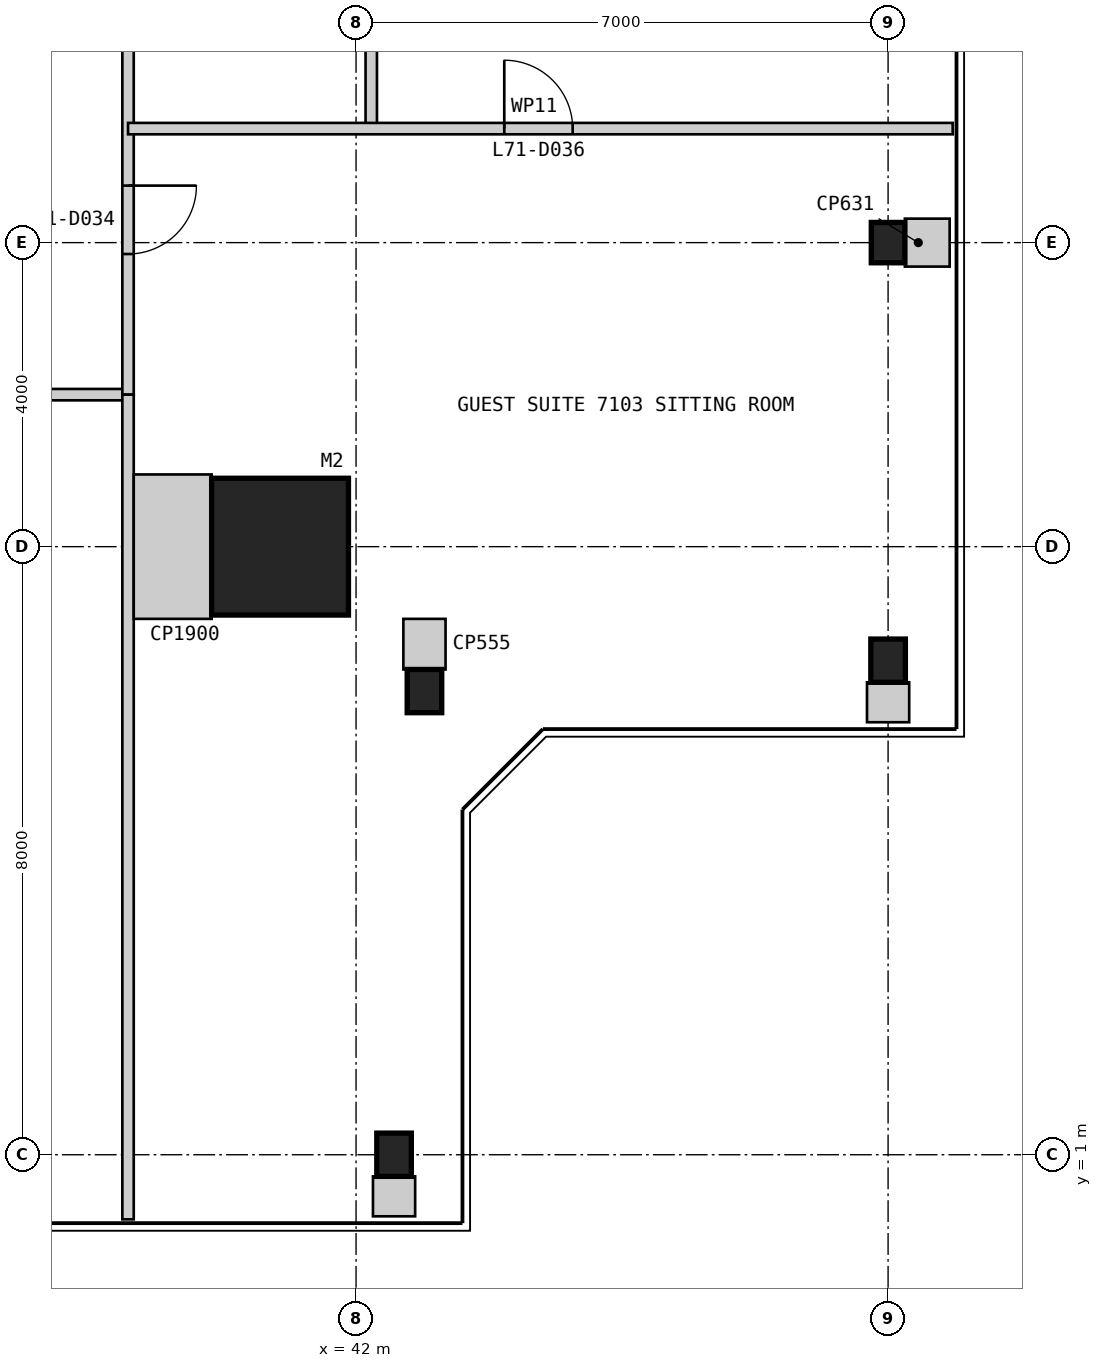
"""IFC4 building model, lengths in metres.
Left out: names, types, materials, properties, quantities, classifications, styles, units other than length and angle.
Written with IfcOpenShell. Run it as: python <this file> out.ifc"""

import sys

from ifc_helpers import new_model, si_unit, direction, frame, frame_2d, origin, origin_2d, place, context, subcontext, project, spatial, rectangle, i_section, extrude, element, fill, save


model = new_model("IFC4")
c1 = context("Model", 3, precision=1e-05, world=origin(), true_north=direction((0.0, 1.0)))
c2 = subcontext(c1, "Body", "Model", "MODEL_VIEW")
j1 = project(units=[si_unit("LENGTHUNIT", "METRE"), si_unit("PLANEANGLEUNIT", "RADIAN")], contexts=[c1])
p1 = place(None, origin())
s1 = spatial("IfcSite", under=j1, at=p1, CompositionType="ELEMENT")
p2 = place(p1, origin())
s2 = spatial("IfcBuilding", under=s1, at=p2, CompositionType="ELEMENT")
p3 = place(p2, frame((0.0, 0.0, 293.4)))
s3 = spatial("IfcBuildingStorey", under=s2, at=p3, CompositionType="ELEMENT", Elevation=293.4)
p4 = place(p3, frame((41.0, 9.0, 0.0), z_axis=(0.0, 0.0, 1.0), x_axis=(1.0, 0.0, 0.0)))
e1 = element("IfcColumn", 1, at=p4, inside=s3, PredefinedType="COLUMN", context=c2, shape_type="SweptSolid", body=[
    extrude(rectangle(XDim=1.8, YDim=1.8, at=origin_2d()), origin(), (0.0, 0.0, 1.0), 3.4),
])
for number, where, z_axis, x_axis in (
    (2, (42.5, 1.0, 0.0), (0.0, 0.0, 1.0), (1.0, 0.0, 0.0)),
    (3, (42.9, 7.1, 0.0), (0.0, 0.0, 1.0), (1.0, 0.0, 0.0)),
    (4, (49.0, 7.5, 0.0), (0.0, 0.0, 1.0), (1.0, 0.0, 0.0)),
):
    element("IfcColumn", number, at=place(p3, frame(where, z_axis=z_axis, x_axis=x_axis)), inside=s3, PredefinedType="COLUMN", context=c2, shape_type="SweptSolid", body=[
        extrude(i_section(OverallWidth=0.455, OverallDepth=0.569, WebThickness=0.078, FlangeThickness=0.125, at=origin_2d()), origin(), (0.0, 0.0, 1.0), 3.4),
    ])
p5 = place(p3, frame((49.0, 13.0, 0.0), z_axis=(0.0, 0.0, 1.0), x_axis=(1.0, 0.0, 0.0)))
e5 = element("IfcColumn", 5, at=p5, inside=s3, PredefinedType="COLUMN", context=c2, shape_type="SweptSolid", body=[
    extrude(i_section(OverallWidth=0.442, OverallDepth=0.531, WebThickness=0.066, FlangeThickness=0.106, at=origin_2d()), origin(), (0.0, 0.0, 1.0), 3.4),
])
p6 = place(p3, frame((11.0, 11.0, 0.0), z_axis=(0.0, 0.0, 1.0), x_axis=(1.0, 0.0, 0.0)))
e6 = element("IfcWall", 6, at=p6, inside=s3, PredefinedType="PARTITIONING", context=c2, shape_type="SweptSolid", body=[
    extrude(rectangle(XDim=28.0, YDim=0.15, at=frame_2d((14.0, 0.0))), origin(), (0.0, 0.0, 1.0), 2.794),
])
p7 = place(p6, frame((1.85, 0.0, 0.0)))
e7 = element("IfcOpeningElement", 7, at=p7, cuts=e6, PredefinedType="OPENING", context=c2, shape_type="SweptSolid", body=[
    extrude(rectangle(XDim=1.0, YDim=2.1, at=frame_2d((0.5, 1.05))), frame((0.0, 0.085, 0.0), z_axis=(0.0, -1.0, 0.0), x_axis=(1.0, 0.0, 0.0)), (0.0, 0.0, 1.0), 0.17),
])
p8 = place(p6, frame((18.1, 0.0, 0.0)))
e8 = element("IfcOpeningElement", 8, at=p8, cuts=e6, PredefinedType="OPENING", context=c2, shape_type="SweptSolid", body=[
    extrude(rectangle(XDim=0.9, YDim=2.1, at=frame_2d((0.45, 1.05))), frame((0.0, 0.085, 0.0), z_axis=(0.0, -1.0, 0.0), x_axis=(1.0, 0.0, 0.0)), (0.0, 0.0, 1.0), 0.17),
])
p9 = place(p3, frame((39.0, 11.0, 0.0), z_axis=(0.0, 0.0, 1.0), x_axis=(0.0, 1.0, 0.0)))
e9 = element("IfcWall", 9, at=p9, inside=s3, PredefinedType="PARTITIONING", context=c2, shape_type="SweptSolid", body=[
    extrude(rectangle(XDim=28.0, YDim=0.15, at=frame_2d((14.0, 0.0))), origin(), (0.0, 0.0, 1.0), 2.794),
])
p10 = place(p9, frame((1.85, 0.0, 0.0)))
e10 = element("IfcOpeningElement", 10, at=p10, cuts=e9, PredefinedType="OPENING", context=c2, shape_type="SweptSolid", body=[
    extrude(rectangle(XDim=0.9, YDim=2.1, at=frame_2d((0.45, 1.05))), frame((0.0, 0.085, 0.0), z_axis=(0.0, -1.0, 0.0), x_axis=(1.0, 0.0, 0.0)), (0.0, 0.0, 1.0), 0.17),
])
p11 = place(p9, frame((11.0, 0.0, 0.0)))
e11 = element("IfcOpeningElement", 11, at=p11, cuts=e9, PredefinedType="OPENING", context=c2, shape_type="SweptSolid", body=[
    extrude(rectangle(XDim=0.9, YDim=2.1, at=frame_2d((0.45, 1.05))), frame((0.0, 0.085, 0.0), z_axis=(0.0, -1.0, 0.0), x_axis=(1.0, 0.0, 0.0)), (0.0, 0.0, 1.0), 0.17),
])
p12 = place(p9, frame((23.1, 0.0, 0.0)))
e12 = element("IfcOpeningElement", 12, at=p12, cuts=e9, PredefinedType="OPENING", context=c2, shape_type="SweptSolid", body=[
    extrude(rectangle(XDim=0.9, YDim=2.1, at=frame_2d((0.45, 1.05))), frame((0.0, 0.085, 0.0), z_axis=(0.0, -1.0, 0.0), x_axis=(1.0, 0.0, 0.0)), (0.0, 0.0, 1.0), 0.17),
])
p13 = place(p3, frame((39.0, 0.15, 0.0), z_axis=(0.0, 0.0, 1.0), x_axis=(0.0, 1.0, 0.0)))
e13 = element("IfcWall", 13, at=p13, inside=s3, PredefinedType="PARTITIONING", context=c2, shape_type="SweptSolid", body=[
    extrude(rectangle(XDim=10.85, YDim=0.15, at=frame_2d((5.425, 0.0))), origin(), (0.0, 0.0, 1.0), 2.794),
])
p14 = place(p3, frame((42.2, 14.5, 0.0), z_axis=(0.0, 0.0, 1.0), x_axis=(0.0, 1.0, 0.0)))
e14 = element("IfcWall", 14, at=p14, inside=s3, PredefinedType="PARTITIONING", context=c2, shape_type="SweptSolid", body=[
    extrude(rectangle(XDim=3.0, YDim=0.15, at=frame_2d((1.5, 0.0))), origin(), (0.0, 0.0, 1.0), 3.2),
])
p15 = place(p3, frame((49.85, 14.5, 0.0), z_axis=(0.0, 0.0, 1.0), x_axis=(-1.0, 0.0, 0.0)))
e15 = element("IfcWall", 15, at=p15, inside=s3, PredefinedType="PARTITIONING", context=c2, shape_type="SweptSolid", body=[
    extrude(rectangle(XDim=10.85, YDim=0.15, at=frame_2d((5.425, 0.0))), origin(), (0.0, 0.0, 1.0), 3.2),
])
p16 = place(p15, frame((5.0, 0.0, 0.0)))
e16 = element("IfcOpeningElement", 16, at=p16, cuts=e15, PredefinedType="OPENING", context=c2, shape_type="SweptSolid", body=[
    extrude(rectangle(XDim=0.9, YDim=2.1, at=frame_2d((0.45, 1.05))), frame((0.0, 0.085, 0.0), z_axis=(0.0, -1.0, 0.0), x_axis=(1.0, 0.0, 0.0)), (0.0, 0.0, 1.0), 0.17),
])
p17 = place(p3, frame((39.075, 9.0, 0.0), z_axis=(0.0, 0.0, 1.0), x_axis=(1.0, 0.0, 0.0)))
e17 = element("IfcWall", 17, at=p17, inside=s3, PredefinedType="PARTITIONING", context=c2, shape_type="SweptSolid", body=[
    extrude(rectangle(XDim=1.025, YDim=1.9, at=frame_2d((0.513, 0.0))), origin(), (0.0, 0.0, 1.0), 3.2),
])
p18 = place(p3, frame((42.5, 0.19, 0.0), z_axis=(0.0, 0.0, 1.0), x_axis=(0.0, 1.0, 0.0)))
e18 = element("IfcWall", 18, at=p18, inside=s3, PredefinedType="PARTITIONING", context=c2, shape_type="SweptSolid", body=[
    extrude(rectangle(XDim=0.526, YDim=0.555, at=frame_2d((0.263, 0.0))), origin(), (0.0, 0.0, 1.0), 3.2),
])
p19 = place(p3, frame((42.9, 8.05, 0.0), z_axis=(0.0, 0.0, 1.0), x_axis=(0.0, -1.0, 0.0)))
e19 = element("IfcWall", 19, at=p19, inside=s3, PredefinedType="PARTITIONING", context=c2, shape_type="SweptSolid", body=[
    extrude(rectangle(XDim=0.666, YDim=0.555, at=frame_2d((0.333, 0.0))), origin(), (0.0, 0.0, 1.0), 3.2),
])
p20 = place(p3, frame((49.0, 6.69, 0.0), z_axis=(0.0, 0.0, 1.0), x_axis=(0.0, 1.0, 0.0)))
e20 = element("IfcWall", 20, at=p20, inside=s3, PredefinedType="PARTITIONING", context=c2, shape_type="SweptSolid", body=[
    extrude(rectangle(XDim=0.526, YDim=0.555, at=frame_2d((0.263, 0.0))), origin(), (0.0, 0.0, 1.0), 3.2),
])
p21 = place(p3, frame((49.81, 13.0, 0.0), z_axis=(0.0, 0.0, 1.0), x_axis=(-1.0, 0.0, 0.0)))
e21 = element("IfcWall", 21, at=p21, inside=s3, PredefinedType="PARTITIONING", context=c2, shape_type="SweptSolid", body=[
    extrude(rectangle(XDim=0.589, YDim=0.631, at=frame_2d((0.294, 0.0))), origin(), (0.0, 0.0, 1.0), 3.2),
])
p22 = place(p10, frame((0.9, 0.0, 0.0), z_axis=(0.0, 0.0, 1.0), x_axis=(-1.0, 0.0, 0.0)))
e22 = element("IfcDoor", 22, at=p22, inside=s3, OperationType="SINGLE_SWING_LEFT", PredefinedType="DOOR", context=c2, shape_type="SweptSolid", body=[
    extrude(rectangle(XDim=0.9, YDim=2.1, at=frame_2d((0.45, 1.05))), frame((0.0, 0.025, 0.0), z_axis=(0.0, -1.0, 0.0), x_axis=(1.0, 0.0, 0.0)), (0.0, 0.0, 1.0), 0.05),
])
fill(e10, e22)
p23 = place(p16, frame((0.9, 0.0, 0.0), z_axis=(0.0, 0.0, 1.0), x_axis=(-1.0, 0.0, 0.0)))
e23 = element("IfcDoor", 23, at=p23, inside=s3, OperationType="SINGLE_SWING_LEFT", PredefinedType="DOOR", context=c2, shape_type="SweptSolid", body=[
    extrude(rectangle(XDim=0.9, YDim=2.1, at=frame_2d((0.45, 1.05))), frame((0.0, 0.025, 0.0), z_axis=(0.0, -1.0, 0.0), x_axis=(1.0, 0.0, 0.0)), (0.0, 0.0, 1.0), 0.05),
])
fill(e16, e23)
save(model, sys.argv[1])
